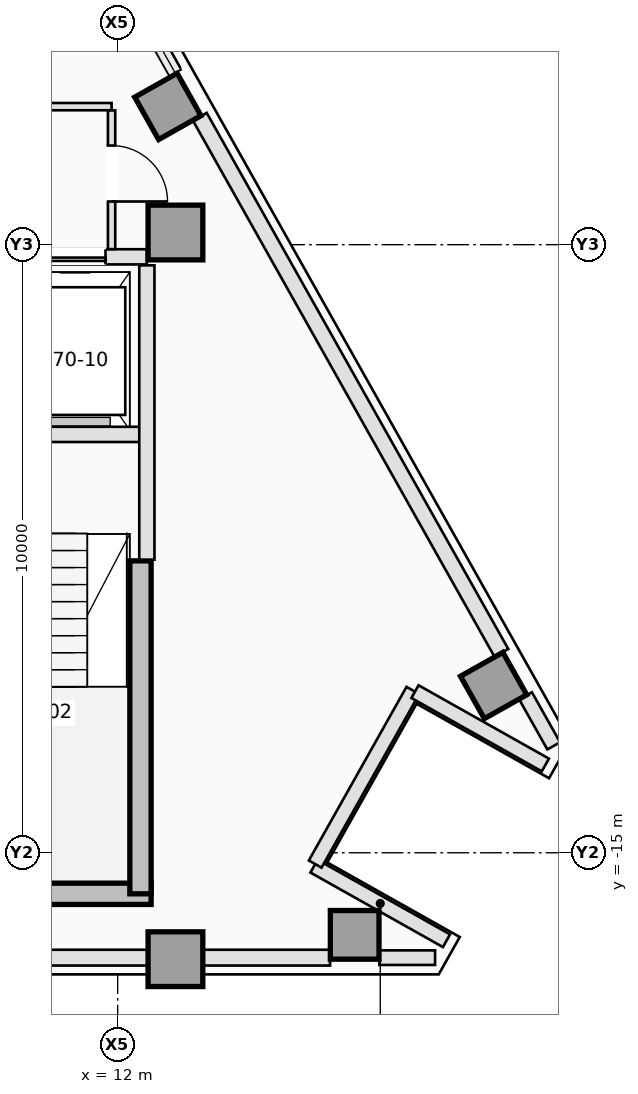
"""IFC4 building model, lengths in metres.
Left out: names, types, materials, properties, quantities, classifications, styles, units other than length and angle.
Written with IfcOpenShell. Run it as: python <this file> out.ifc"""

import sys

from ifc_helpers import new_model, si_unit, direction, frame, frame_2d, origin, origin_2d, place, context, subcontext, project, spatial, rectangle, extrude, element, fill, save


model = new_model("IFC4")
c1 = context("Model", 3, precision=1e-05, world=origin(), true_north=direction((0.0, 1.0)))
c2 = subcontext(c1, "Body", "Model", "MODEL_VIEW")
j1 = project(units=[si_unit("LENGTHUNIT", "METRE"), si_unit("PLANEANGLEUNIT", "RADIAN")], contexts=[c1])
p1 = place(None, origin())
s1 = spatial("IfcSite", under=j1, at=p1, CompositionType="ELEMENT")
p2 = place(p1, origin())
s2 = spatial("IfcBuilding", under=s1, at=p2, CompositionType="ELEMENT")
p3 = place(p2, frame((0.0, 0.0, 253.4)))
s3 = spatial("IfcBuildingStorey", under=s2, at=p3, CompositionType="ELEMENT", Elevation=253.4)
p4 = place(p3, frame((8.85, -15.675, 0.0), z_axis=(0.0, 0.0, 1.0), x_axis=(1.0, 0.0, 0.0)))
e1 = element("IfcWall", 1, at=p4, inside=s3, PredefinedType="SHEAR", context=c2, shape_type="SweptSolid", body=[
    extrude(rectangle(XDim=3.7, YDim=0.35, at=frame_2d((1.85, 0.0))), origin(), (0.0, 0.0, 1.0), 3.5),
])
p5 = place(p3, frame((12.375, -15.675, 0.0), z_axis=(0.0, 0.0, 1.0), x_axis=(0.0, 1.0, 0.0)))
e2 = element("IfcWall", 2, at=p5, inside=s3, PredefinedType="SHEAR", context=c2, shape_type="SweptSolid", body=[
    extrude(rectangle(XDim=5.475, YDim=0.35, at=frame_2d((2.738, 0.0))), origin(), (0.0, 0.0, 1.0), 3.5),
])
for number, where, z_axis, x_axis in (
    (3, (12.95, -16.75, 0.0), (0.0, 0.0, 1.0), (1.0, 0.0, 0.0)),
    (4, (12.95, -4.8, 0.0), (0.0, 0.0, 1.0), (1.0, 0.0, 0.0)),
):
    element("IfcColumn", number, at=place(p3, frame(where, z_axis=z_axis, x_axis=x_axis)), inside=s3, PredefinedType="COLUMN", context=c2, shape_type="SweptSolid", body=[
        extrude(rectangle(XDim=0.9, YDim=0.9, at=origin_2d()), origin(), (0.0, 0.0, 1.0), 3.5),
    ])
for number, where, z_axis, x_axis in (
    (5, (15.898, -16.35, 0.0), (0.0, 0.0, 1.0), (0.0, 1.0, 0.0)),
    (6, (18.182, -12.25, 0.0), (0.0, 0.0, 1.0), (0.872, 0.49, 0.0)),
    (7, (12.825, -2.727, 0.0), (0.0, 0.0, 1.0), (0.872, 0.49, 0.0)),
):
    element("IfcColumn", number, at=place(p3, frame(where, z_axis=z_axis, x_axis=x_axis)), inside=s3, PredefinedType="COLUMN", context=c2, shape_type="SweptSolid", body=[
        extrude(rectangle(XDim=0.8, YDim=0.8, at=origin_2d()), origin(), (0.0, 0.0, 1.0), 3.5),
    ])
p6 = place(p3, frame((17.22, -16.725, 0.0), z_axis=(0.0, 0.0, 1.0), x_axis=(-1.0, 0.0, 0.0)))
e8 = element("IfcWall", 8, at=p6, inside=s3, PredefinedType="STANDARD", context=c2, shape_type="SweptSolid", body=[
    extrude(rectangle(XDim=0.917, YDim=0.24, at=frame_2d((0.459, 0.0))), origin(), (0.0, 0.0, 1.0), 3.25),
])
p7 = place(p3, frame((15.493, -16.725, 0.0), z_axis=(0.0, 0.0, 1.0), x_axis=(-1.0, 0.0, 0.0)))
e9 = element("IfcWall", 9, at=p7, inside=s3, PredefinedType="STANDARD", context=c2, shape_type="SweptSolid", body=[
    extrude(rectangle(XDim=11.273, YDim=0.26, at=frame_2d((5.636, 0.0))), origin(), (0.0, 0.0, 1.0), 2.79),
])
p8 = place(p3, frame((18.708, -12.419, 0.0), z_axis=(0.0, 0.0, 1.0), x_axis=(0.490199895283, -0.871610040479, 0.0)))
e10 = element("IfcWall", 10, at=p8, inside=s3, PredefinedType="STANDARD", context=c2, shape_type="SweptSolid", body=[
    extrude(rectangle(XDim=0.945, YDim=0.24, at=frame_2d((0.472, 0.0))), origin(), (0.0, 0.0, 1.0), 3.25),
])
p9 = place(p3, frame((13.351, -2.896, 0.0), z_axis=(0.0, 0.0, 1.0), x_axis=(0.490266968583, -0.871572314565, 0.0)))
e11 = element("IfcWall", 11, at=p9, inside=s3, PredefinedType="STANDARD", context=c2, shape_type="SweptSolid", body=[
    extrude(rectangle(XDim=10.116, YDim=0.26, at=frame_2d((5.058, 0.0))), origin(), (0.0, 0.0, 1.0), 3.25),
])
p10 = place(p3, frame((17.408, -16.447, 0.0), z_axis=(0.0, 0.0, 1.0), x_axis=(-0.871588577066, 0.490238056792, 0.0)))
e12 = element("IfcWall", 12, at=p10, inside=s3, PredefinedType="STANDARD", context=c2, shape_type="SweptSolid", body=[
    extrude(rectangle(XDim=2.5, YDim=0.24, at=frame_2d((1.25, 0.0))), origin(), (0.0, 0.0, 1.0), 3.25),
])
p11 = place(p3, frame((15.248, -15.186, 0.0), z_axis=(0.0, 0.0, 1.0), x_axis=(0.490293083368, 0.871557624258, 0.0)))
e13 = element("IfcWall", 13, at=p11, inside=s3, PredefinedType="STANDARD", context=c2, shape_type="SweptSolid", body=[
    extrude(rectangle(XDim=3.276, YDim=0.24, at=frame_2d((1.638, 0.0))), origin(), (0.0, 0.0, 1.0), 2.79),
])
p12 = place(p3, frame((16.889, -12.35, 0.0), z_axis=(0.0, 0.0, 1.0), x_axis=(0.87157023615, -0.490270663468, 0.0)))
e14 = element("IfcWall", 14, at=p12, inside=s3, PredefinedType="STANDARD", context=c2, shape_type="SweptSolid", body=[
    extrude(rectangle(XDim=2.46, YDim=0.24, at=frame_2d((1.23, 0.0))), origin(), (0.0, 0.0, 1.0), 3.25),
])
p13 = place(p3, frame((9.16, -8.12, 0.0), z_axis=(0.0, 0.0, 1.0), x_axis=(1.0, 0.0, 0.0)))
e15 = element("IfcWall", 15, at=p13, inside=s3, PredefinedType="PARTITIONING", context=c2, shape_type="SweptSolid", body=[
    extrude(rectangle(XDim=3.22, YDim=0.25, at=frame_2d((1.61, 0.0))), origin(), (0.0, 0.0, 1.0), 3.25),
])
p14 = place(p3, frame((12.48, -10.18, 0.0), z_axis=(0.0, 0.0, 1.0), x_axis=(0.0, 1.0, 0.0)))
e16 = element("IfcWall", 16, at=p14, inside=s3, PredefinedType="PARTITIONING", context=c2, shape_type="SweptSolid", body=[
    extrude(rectangle(XDim=4.84, YDim=0.25, at=frame_2d((2.42, 0.0))), origin(), (0.0, 0.0, 1.0), 3.25),
])
p15 = place(p3, frame((4.202, -5.2, 0.0), z_axis=(0.0, 0.0, 1.0), x_axis=(1.0, 0.0, 0.0)))
e17 = element("IfcWall", 17, at=p15, inside=s3, PredefinedType="PARTITIONING", context=c2, shape_type="SweptSolid", body=[
    extrude(rectangle(XDim=8.278, YDim=0.25, at=frame_2d((4.139, 0.0))), origin(), (0.0, 0.0, 1.0), 3.25),
])
p16 = place(p15, frame((0.748, 0.0, 0.0)))
e18 = element("IfcOpeningElement", 18, at=p16, cuts=e17, PredefinedType="OPENING", context=c2, shape_type="SweptSolid", body=[
    extrude(rectangle(XDim=1.0, YDim=2.15, at=frame_2d((0.5, 1.075))), frame((0.0, 0.135, 0.0), z_axis=(0.0, -1.0, 0.0), x_axis=(1.0, 0.0, 0.0)), (0.0, 0.0, 1.0), 0.27),
])
p17 = place(p15, frame((2.698, 0.0, 0.0)))
e19 = element("IfcOpeningElement", 19, at=p17, cuts=e17, PredefinedType="OPENING", context=c2, shape_type="SweptSolid", body=[
    extrude(rectangle(XDim=1.0, YDim=2.15, at=frame_2d((0.5, 1.075))), frame((0.0, 0.135, 0.0), z_axis=(0.0, -1.0, 0.0), x_axis=(1.0, 0.0, 0.0)), (0.0, 0.0, 1.0), 0.27),
])
p18 = place(p15, frame((4.648, 0.0, 0.0)))
e20 = element("IfcOpeningElement", 20, at=p18, cuts=e17, PredefinedType="OPENING", context=c2, shape_type="SweptSolid", body=[
    extrude(rectangle(XDim=1.0, YDim=2.15, at=frame_2d((0.5, 1.075))), frame((0.0, 0.135, 0.0), z_axis=(0.0, -1.0, 0.0), x_axis=(1.0, 0.0, 0.0)), (0.0, 0.0, 1.0), 0.27),
])
p19 = place(p15, frame((6.598, 0.0, 0.0)))
e21 = element("IfcOpeningElement", 21, at=p19, cuts=e17, PredefinedType="OPENING", context=c2, shape_type="SweptSolid", body=[
    extrude(rectangle(XDim=1.0, YDim=2.15, at=frame_2d((0.5, 1.075))), frame((0.0, 0.135, 0.0), z_axis=(0.0, -1.0, 0.0), x_axis=(1.0, 0.0, 0.0)), (0.0, 0.0, 1.0), 0.27),
])
p20 = place(p3, frame((6.572, -2.73, 0.0), z_axis=(0.0, 0.0, 1.0), x_axis=(1.0, 0.0, 0.0)))
e22 = element("IfcWall", 22, at=p20, inside=s3, PredefinedType="PARTITIONING", context=c2, shape_type="SweptSolid", body=[
    extrude(rectangle(XDim=5.328, YDim=0.12, at=frame_2d((2.664, 0.0))), origin(), (0.0, 0.0, 1.0), 3.25),
])
p21 = place(p20, frame((3.404, 0.0, 0.0)))
e23 = element("IfcOpeningElement", 23, at=p21, cuts=e22, PredefinedType="OPENING", context=c2, shape_type="SweptSolid", body=[
    extrude(rectangle(XDim=0.92, YDim=2.12, at=frame_2d((0.46, 1.06))), frame((0.0, 0.07, 0.0), z_axis=(0.0, -1.0, 0.0), x_axis=(1.0, 0.0, 0.0)), (0.0, 0.0, 1.0), 0.14),
])
p22 = place(p3, frame((11.9, -2.792, 0.0), z_axis=(0.0, 0.0, 1.0), x_axis=(0.0, -1.0, 0.0)))
e24 = element("IfcWall", 24, at=p22, inside=s3, PredefinedType="PARTITIONING", context=c2, shape_type="SweptSolid", body=[
    extrude(rectangle(XDim=2.281, YDim=0.12, at=frame_2d((1.141, 0.0))), origin(), (0.0, 0.0, 1.0), 3.25),
])
p23 = place(p22, frame((0.578, 0.0, 0.0)))
e25 = element("IfcOpeningElement", 25, at=p23, cuts=e24, PredefinedType="OPENING", context=c2, shape_type="SweptSolid", body=[
    extrude(rectangle(XDim=0.92, YDim=2.12, at=frame_2d((0.46, 1.06))), frame((0.0, 0.07, 0.0), z_axis=(0.0, -1.0, 0.0), x_axis=(1.0, 0.0, 0.0)), (0.0, 0.0, 1.0), 0.14),
])
p24 = place(p19, origin())
e26 = element("IfcDoor", 26, at=p24, inside=s3, OperationType="SLIDING_TO_RIGHT", PredefinedType="DOOR", context=c2, shape_type="SweptSolid", body=[
    extrude(rectangle(XDim=1.0, YDim=2.15, at=frame_2d((0.5, 1.075))), frame((0.0, 0.025, 0.0), z_axis=(0.0, -1.0, 0.0), x_axis=(1.0, 0.0, 0.0)), (0.0, 0.0, 1.0), 0.05),
])
fill(e21, e26)
p25 = place(p23, origin())
e27 = element("IfcDoor", 27, at=p25, inside=s3, OperationType="SINGLE_SWING_RIGHT", PredefinedType="DOOR", context=c2, shape_type="SweptSolid", body=[
    extrude(rectangle(XDim=0.92, YDim=2.12, at=frame_2d((0.46, 1.06))), frame((0.0, 0.025, 0.0), z_axis=(0.0, -1.0, 0.0), x_axis=(1.0, 0.0, 0.0)), (0.0, 0.0, 1.0), 0.05),
])
fill(e25, e27)
save(model, sys.argv[1])
